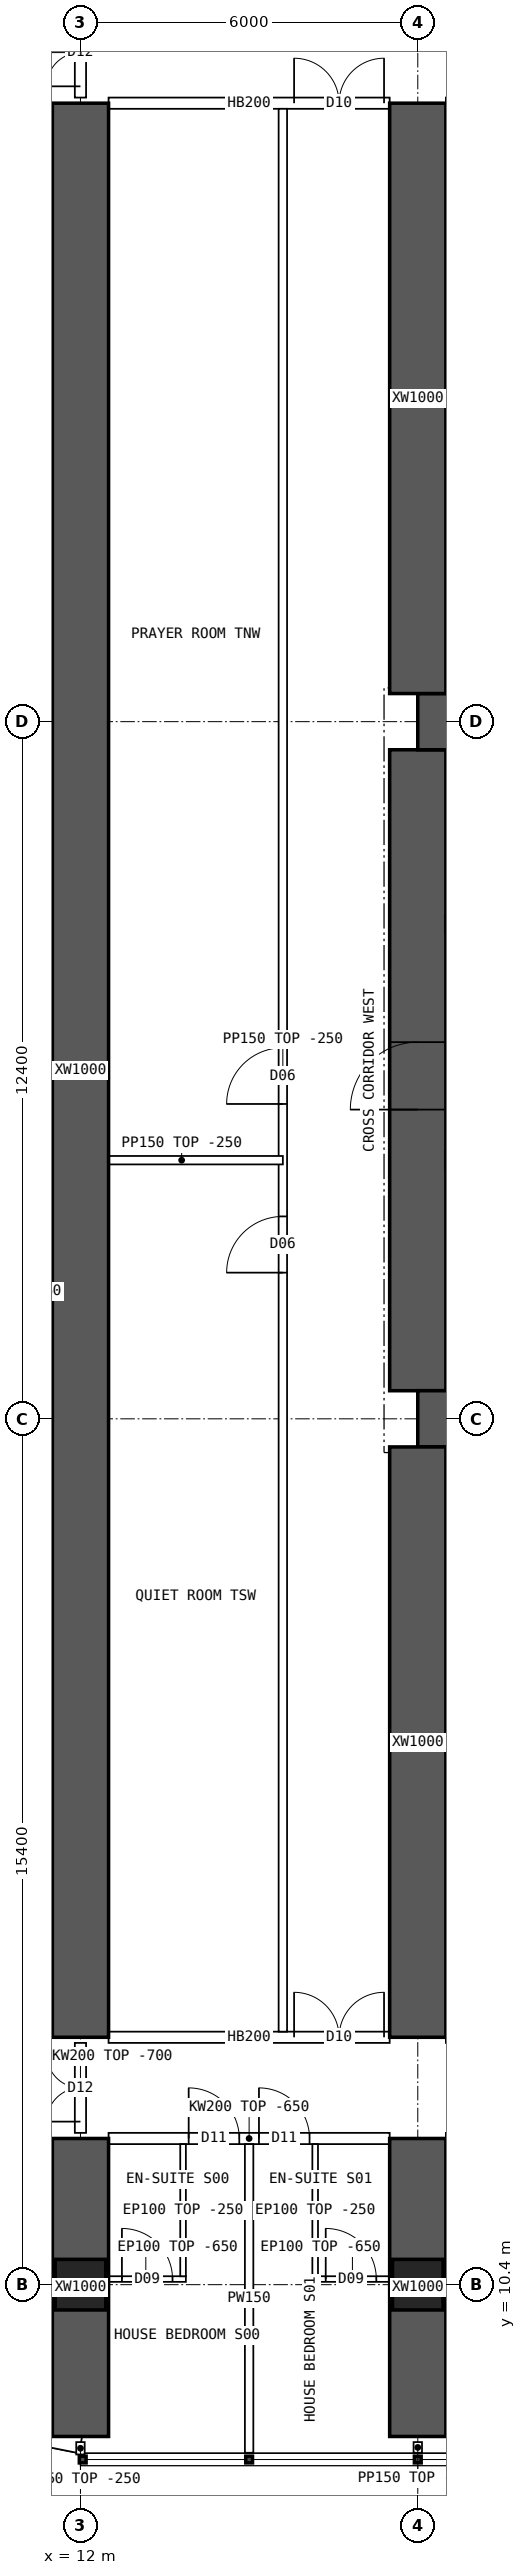
"""IFC4 building model, lengths in metres.
Left out: names, types, materials, properties, quantities, classifications, styles, units other than length and angle.
Written with IfcOpenShell. Run it as: python <this file> out.ifc"""

import sys

from ifc_helpers import new_model, si_unit, direction, frame, frame_2d, origin, origin_2d, place, context, subcontext, project, spatial, polyline, rectangle, hollow_rectangle, outline, extrude, element, fill, save


model = new_model("IFC4")
c1 = context("Model", 3, precision=1e-05, world=origin(), true_north=direction((0.0, 1.0)))
c2 = subcontext(c1, "Body", "Model", "MODEL_VIEW")
j1 = project(units=[si_unit("LENGTHUNIT", "METRE"), si_unit("PLANEANGLEUNIT", "RADIAN")], contexts=[c1])
p1 = place(None, origin())
s1 = spatial("IfcSite", under=j1, at=p1, CompositionType="ELEMENT")
p2 = place(p1, origin())
s2 = spatial("IfcBuilding", under=s1, at=p2, CompositionType="ELEMENT")
p3 = place(p2, frame((0.0, 0.0, 23.95)))
s3 = spatial("IfcBuildingStorey", under=s2, at=p3, CompositionType="ELEMENT", Elevation=23.95)
for number, where, z_axis, x_axis in (
    (1, (12.0, 10.4, 0.0), (0.0, 0.0, 1.0), (1.0, 0.0, 0.0)),
    (2, (18.0, 10.4, 0.0), (0.0, 0.0, 1.0), (1.0, 0.0, 0.0)),
):
    element("IfcColumn", number, at=place(p3, frame(where, z_axis=z_axis, x_axis=x_axis)), inside=s3, PredefinedType="COLUMN", context=c2, shape_type="SweptSolid", body=[
        extrude(hollow_rectangle(XDim=0.9, YDim=0.9, WallThickness=0.09, at=origin_2d()), origin(), (0.0, 0.0, 1.0), 3.75),
    ])
for number, where, z_axis, x_axis in (
    (3, (18.0, 25.8, 0.0), (0.0, 0.0, 1.0), (1.0, 0.0, 0.0)),
    (4, (18.0, 38.2, 0.0), (0.0, 0.0, 1.0), (1.0, 0.0, 0.0)),
):
    element("IfcWall", number, at=place(p3, frame(where, z_axis=z_axis, x_axis=x_axis)), inside=s3, PredefinedType="SHEAR", context=c2, shape_type="SweptSolid", body=[
        extrude(rectangle(XDim=48.0, YDim=1.0, at=frame_2d((24.0, 0.0))), origin(), (0.0, 0.0, 1.0), 3.75),
    ])
p4 = place(p3, frame((18.0, 26.3, 0.0), z_axis=(0.0, 0.0, 1.0), x_axis=(0.0, 1.0, 0.0)))
e5 = element("IfcWall", 5, at=p4, inside=s3, PredefinedType="SHEAR", context=c2, shape_type="SweptSolid", body=[
    extrude(rectangle(XDim=11.4, YDim=1.0, at=frame_2d((5.7, 0.0))), origin(), (0.0, 0.0, 1.0), 3.75),
])
p5 = place(p4, frame((5.0, 0.0, 0.0)))
e6 = element("IfcOpeningElement", 6, at=p5, cuts=e5, PredefinedType="OPENING", context=c2, shape_type="SweptSolid", body=[
    extrude(rectangle(XDim=1.2, YDim=2.1, at=frame_2d((0.6, 1.05))), frame((0.0, 0.51, 0.0), z_axis=(0.0, -1.0, 0.0), x_axis=(1.0, 0.0, 0.0)), (0.0, 0.0, 1.0), 1.02),
])
p6 = place(p3, frame((12.0, 7.7, 0.0), z_axis=(0.0, 0.0, 1.0), x_axis=(0.0, 1.0, 0.0)))
e7 = element("IfcWall", 7, at=p6, inside=s3, PredefinedType="SHEAR", context=c2, shape_type="SweptSolid", body=[
    extrude(rectangle(XDim=5.3, YDim=1.0, at=frame_2d((2.65, 0.0))), origin(), (0.0, 0.0, 1.0), 3.75),
])
p7 = place(p3, frame((12.0, 14.8, 0.0), z_axis=(0.0, 0.0, 1.0), x_axis=(0.0, 1.0, 0.0)))
e8 = element("IfcWall", 8, at=p7, inside=s3, PredefinedType="SHEAR", context=c2, shape_type="SweptSolid", body=[
    extrude(rectangle(XDim=34.4, YDim=1.0, at=frame_2d((17.2, 0.0))), origin(), (0.0, 0.0, 1.0), 3.75),
])
p8 = place(p3, frame((18.0, 7.7, 0.0), z_axis=(0.0, 0.0, 1.0), x_axis=(0.0, 1.0, 0.0)))
e9 = element("IfcWall", 9, at=p8, inside=s3, PredefinedType="SHEAR", context=c2, shape_type="SweptSolid", body=[
    extrude(rectangle(XDim=5.3, YDim=1.0, at=frame_2d((2.65, 0.0))), origin(), (0.0, 0.0, 1.0), 3.75),
])
for number, where, z_axis, x_axis in (
    (10, (18.0, 14.8, 0.0), (0.0, 0.0, 1.0), (0.0, 1.0, 0.0)),
    (11, (18.0, 38.7, 0.0), (0.0, 0.0, 1.0), (0.0, 1.0, 0.0)),
):
    element("IfcWall", number, at=place(p3, frame(where, z_axis=z_axis, x_axis=x_axis)), inside=s3, PredefinedType="SHEAR", context=c2, shape_type="SweptSolid", body=[
        extrude(rectangle(XDim=10.5, YDim=1.0, at=frame_2d((5.25, 0.0))), origin(), (0.0, 0.0, 1.0), 3.75),
    ])
p9 = place(p3, frame((8.843, 8.178, 0.0), z_axis=(0.0, 0.0, 1.0), x_axis=(0.980787251524, -0.195080412259, 0.0)))
e12 = element("IfcWall", 12, at=p9, inside=s3, PredefinedType="SOLIDWALL", context=c2, shape_type="SweptSolid", body=[
    extrude(outline(polyline([(-0.03, -0.15), (3.249, -0.15), (3.189, 0.15), (0.03, 0.15), (-0.03, -0.15)])), origin(), (0.0, 0.0, 1.0), 3.5),
])
p10 = place(p9, frame((0.909, 0.0, 0.9)))
e13 = element("IfcOpeningElement", 13, at=p10, cuts=e12, PredefinedType="OPENING", context=c2, shape_type="SweptSolid", body=[
    extrude(rectangle(XDim=1.4, YDim=1.8, at=frame_2d((0.7, 0.9))), frame((0.0, 0.16, 0.0), z_axis=(0.0, -1.0, 0.0), x_axis=(1.0, 0.0, 0.0)), (0.0, 0.0, 1.0), 0.32),
])
p11 = place(p3, frame((12.5, 13.0, 0.0), z_axis=(0.0, 0.0, 1.0), x_axis=(1.0, 0.0, 0.0)))
e14 = element("IfcWall", 14, at=p11, inside=s3, PredefinedType="SOLIDWALL", context=c2, shape_type="SweptSolid", body=[
    extrude(outline(polyline([(0.0, 0.0), (5.0, 0.0), (5.0, 3.1), (0.0, 3.1), (0.0, 0.0)])), frame((0.0, 0.1, 0.0), z_axis=(0.0, -1.0, 0.0), x_axis=(1.0, 0.0, 0.0)), (0.0, 0.0, 1.0), 0.2),
])
p12 = place(p11, frame((1.425, 0.0, 0.0)))
e15 = element("IfcOpeningElement", 15, at=p12, cuts=e14, PredefinedType="OPENING", context=c2, shape_type="SweptSolid", body=[
    extrude(rectangle(XDim=0.9, YDim=2.1, at=frame_2d((0.45, 1.05))), frame((0.0, 0.11, 0.0), z_axis=(0.0, -1.0, 0.0), x_axis=(1.0, 0.0, 0.0)), (0.0, 0.0, 1.0), 0.22),
])
p13 = place(p11, frame((2.675, 0.0, 0.0)))
e16 = element("IfcOpeningElement", 16, at=p13, cuts=e14, PredefinedType="OPENING", context=c2, shape_type="SweptSolid", body=[
    extrude(rectangle(XDim=0.9, YDim=2.1, at=frame_2d((0.45, 1.05))), frame((0.0, 0.11, 0.0), z_axis=(0.0, -1.0, 0.0), x_axis=(1.0, 0.0, 0.0)), (0.0, 0.0, 1.0), 0.22),
])
p14 = place(p3, frame((12.5, 14.8, 0.0), z_axis=(0.0, 0.0, 1.0), x_axis=(1.0, 0.0, 0.0)))
e17 = element("IfcWall", 17, at=p14, inside=s3, PredefinedType="SOLIDWALL", context=c2, shape_type="SweptSolid", body=[
    extrude(rectangle(XDim=5.0, YDim=0.2, at=frame_2d((2.5, 0.0))), origin(), (0.0, 0.0, 1.0), 3.5),
])
p15 = place(p14, frame((3.3, 0.0, 0.0)))
e18 = element("IfcOpeningElement", 18, at=p15, cuts=e17, PredefinedType="OPENING", context=c2, shape_type="SweptSolid", body=[
    extrude(rectangle(XDim=1.6, YDim=2.1, at=frame_2d((0.8, 1.05))), frame((0.0, 0.11, 0.0), z_axis=(0.0, -1.0, 0.0), x_axis=(1.0, 0.0, 0.0)), (0.0, 0.0, 1.0), 0.22),
])
p16 = place(p3, frame((12.5, 49.2, 0.0), z_axis=(0.0, 0.0, 1.0), x_axis=(1.0, 0.0, 0.0)))
e19 = element("IfcWall", 19, at=p16, inside=s3, PredefinedType="SOLIDWALL", context=c2, shape_type="SweptSolid", body=[
    extrude(rectangle(XDim=5.0, YDim=0.2, at=frame_2d((2.5, 0.0))), origin(), (0.0, 0.0, 1.0), 3.5),
])
p17 = place(p16, frame((3.3, 0.0, 0.0)))
e20 = element("IfcOpeningElement", 20, at=p17, cuts=e19, PredefinedType="OPENING", context=c2, shape_type="SweptSolid", body=[
    extrude(rectangle(XDim=1.6, YDim=2.1, at=frame_2d((0.8, 1.05))), frame((0.0, 0.11, 0.0), z_axis=(0.0, -1.0, 0.0), x_axis=(1.0, 0.0, 0.0)), (0.0, 0.0, 1.0), 0.22),
])
p18 = place(p3, frame((15.0, 7.41, 0.0), z_axis=(0.0, 0.0, 1.0), x_axis=(0.0, 1.0, 0.0)))
e21 = element("IfcWall", 21, at=p18, inside=s3, PredefinedType="PARTITIONING", context=c2, shape_type="SweptSolid", body=[
    extrude(outline(polyline([(0.0, 0.0), (5.49, 0.0), (5.49, 3.1), (5.442, 3.1), (5.44, 3.5), (3.192, 3.5), (3.19, 3.1), (2.792, 3.1), (2.79, 3.5), (0.0, 3.5), (0.0, 0.0)])), frame((0.0, 0.075, 0.0), z_axis=(0.0, -1.0, 0.0), x_axis=(1.0, 0.0, 0.0)), (0.0, 0.0, 1.0), 0.15),
])
p19 = place(p3, frame((13.875, 10.5, 0.0), z_axis=(0.0, 0.0, 1.0), x_axis=(-1.0, 0.0, 0.0)))
e22 = element("IfcWall", 22, at=p19, inside=s3, PredefinedType="PARTITIONING", context=c2, shape_type="SweptSolid", body=[
    extrude(outline(polyline([(0.0, 0.0), (1.425, 0.0), (1.425, 3.1), (0.0, 3.1), (0.0, 0.0)])), frame((0.0, 0.05, 0.0), z_axis=(0.0, -1.0, 0.0), x_axis=(1.0, 0.0, 0.0)), (0.0, 0.0, 1.0), 0.1),
])
p20 = place(p19, frame((0.238, 0.0, 0.0)))
e23 = element("IfcOpeningElement", 23, at=p20, cuts=e22, PredefinedType="OPENING", context=c2, shape_type="SweptSolid", body=[
    extrude(rectangle(XDim=0.9, YDim=2.1, at=frame_2d((0.45, 1.05))), frame((0.0, 0.06, 0.0), z_axis=(0.0, -1.0, 0.0), x_axis=(1.0, 0.0, 0.0)), (0.0, 0.0, 1.0), 0.12),
])
p21 = place(p3, frame((13.825, 10.55, 0.0), z_axis=(0.0, 0.0, 1.0), x_axis=(0.0, 1.0, 0.0)))
e24 = element("IfcWall", 24, at=p21, inside=s3, PredefinedType="PARTITIONING", context=c2, shape_type="SweptSolid", body=[
    extrude(outline(polyline([(0.0, 0.0), (2.35, 0.0), (2.35, 3.1), (2.302, 3.1), (2.3, 3.5), (0.052, 3.5), (0.05, 3.1), (0.0, 3.1), (0.0, 0.0)])), frame((0.0, 0.05, 0.0), z_axis=(0.0, -1.0, 0.0), x_axis=(1.0, 0.0, 0.0)), (0.0, 0.0, 1.0), 0.1),
])
p22 = place(p3, frame((17.55, 10.5, 0.0), z_axis=(0.0, 0.0, 1.0), x_axis=(-1.0, 0.0, 0.0)))
e25 = element("IfcWall", 25, at=p22, inside=s3, PredefinedType="PARTITIONING", context=c2, shape_type="SweptSolid", body=[
    extrude(outline(polyline([(0.0, 0.0), (1.425, 0.0), (1.425, 3.1), (0.0, 3.1), (0.0, 0.0)])), frame((0.0, 0.05, 0.0), z_axis=(0.0, -1.0, 0.0), x_axis=(1.0, 0.0, 0.0)), (0.0, 0.0, 1.0), 0.1),
])
p23 = place(p22, frame((0.288, 0.0, 0.0)))
e26 = element("IfcOpeningElement", 26, at=p23, cuts=e25, PredefinedType="OPENING", context=c2, shape_type="SweptSolid", body=[
    extrude(rectangle(XDim=0.9, YDim=2.1, at=frame_2d((0.45, 1.05))), frame((0.0, 0.06, 0.0), z_axis=(0.0, -1.0, 0.0), x_axis=(1.0, 0.0, 0.0)), (0.0, 0.0, 1.0), 0.12),
])
p24 = place(p3, frame((16.175, 10.55, 0.0), z_axis=(0.0, 0.0, 1.0), x_axis=(0.0, 1.0, 0.0)))
e27 = element("IfcWall", 27, at=p24, inside=s3, PredefinedType="PARTITIONING", context=c2, shape_type="SweptSolid", body=[
    extrude(outline(polyline([(0.0, 0.0), (2.35, 0.0), (2.35, 3.1), (2.302, 3.1), (2.3, 3.5), (0.052, 3.5), (0.05, 3.1), (0.0, 3.1), (0.0, 0.0)])), frame((0.0, 0.05, 0.0), z_axis=(0.0, -1.0, 0.0), x_axis=(1.0, 0.0, 0.0)), (0.0, 0.0, 1.0), 0.1),
])
p25 = place(p3, frame((19.875, 10.5, 0.0), z_axis=(0.0, 0.0, 1.0), x_axis=(-1.0, 0.0, 0.0)))
e28 = element("IfcWall", 28, at=p25, inside=s3, PredefinedType="PARTITIONING", context=c2, shape_type="SweptSolid", body=[
    extrude(outline(polyline([(0.0, 0.0), (1.425, 0.0), (1.425, 3.1), (0.0, 3.1), (0.0, 0.0)])), frame((0.0, 0.05, 0.0), z_axis=(0.0, -1.0, 0.0), x_axis=(1.0, 0.0, 0.0)), (0.0, 0.0, 1.0), 0.1),
])
p26 = place(p25, frame((0.238, 0.0, 0.0)))
e29 = element("IfcOpeningElement", 29, at=p26, cuts=e28, PredefinedType="OPENING", context=c2, shape_type="SweptSolid", body=[
    extrude(rectangle(XDim=0.9, YDim=2.1, at=frame_2d((0.45, 1.05))), frame((0.0, 0.06, 0.0), z_axis=(0.0, -1.0, 0.0), x_axis=(1.0, 0.0, 0.0)), (0.0, 0.0, 1.0), 0.12),
])
p27 = place(p3, frame((15.6, 14.9, 0.0), z_axis=(0.0, 0.0, 1.0), x_axis=(0.0, 1.0, 0.0)))
e30 = element("IfcWall", 30, at=p27, inside=s3, PredefinedType="PARTITIONING", context=c2, shape_type="SweptSolid", body=[
    extrude(rectangle(XDim=34.2, YDim=0.15, at=frame_2d((17.1, 0.0))), origin(), (0.0, 0.0, 1.0), 3.5),
])
p28 = place(p27, frame((13.5, 0.0, 0.0)))
e31 = element("IfcOpeningElement", 31, at=p28, cuts=e30, PredefinedType="OPENING", context=c2, shape_type="SweptSolid", body=[
    extrude(rectangle(XDim=1.0, YDim=2.1, at=frame_2d((0.5, 1.05))), frame((0.0, 0.085, 0.0), z_axis=(0.0, -1.0, 0.0), x_axis=(1.0, 0.0, 0.0)), (0.0, 0.0, 1.0), 0.17),
])
p29 = place(p27, frame((16.5, 0.0, 0.0)))
e32 = element("IfcOpeningElement", 32, at=p29, cuts=e30, PredefinedType="OPENING", context=c2, shape_type="SweptSolid", body=[
    extrude(rectangle(XDim=1.0, YDim=2.1, at=frame_2d((0.5, 1.05))), frame((0.0, 0.085, 0.0), z_axis=(0.0, -1.0, 0.0), x_axis=(1.0, 0.0, 0.0)), (0.0, 0.0, 1.0), 0.17),
])
p30 = place(p3, frame((12.0, 30.4, 0.0), z_axis=(0.0, 0.0, 1.0), x_axis=(1.0, 0.0, 0.0)))
e33 = element("IfcWall", 33, at=p30, inside=s3, PredefinedType="PARTITIONING", context=c2, shape_type="SweptSolid", body=[
    extrude(rectangle(XDim=3.6, YDim=0.15, at=frame_2d((1.8, 0.0))), origin(), (0.0, 0.0, 1.0), 3.5),
])
p31 = place(p3, frame((3.905, 30.85, 0.0), z_axis=(0.0, 0.0, 1.0), x_axis=(1.0, 0.0, 0.0)))
e34 = element("IfcWall", 34, at=p31, inside=s3, PredefinedType="PARTITIONING", context=c2, shape_type="SweptSolid", body=[
    extrude(outline(polyline([(0.0, 0.0), (8.02, 0.0), (8.02, 3.5), (2.397, 3.5), (2.395, 3.05), (1.797, 3.05), (1.795, 3.5), (0.0, 3.5), (0.0, 0.0)])), frame((0.0, 0.075, 0.0), z_axis=(0.0, -1.0, 0.0), x_axis=(1.0, 0.0, 0.0)), (0.0, 0.0, 1.0), 0.15),
])
p32 = place(p3, frame((12.0, 13.1, 0.0), z_axis=(0.0, 0.0, 1.0), x_axis=(0.0, 1.0, 0.0)))
e35 = element("IfcWall", 35, at=p32, inside=s3, PredefinedType="SOLIDWALL", context=c2, shape_type="SweptSolid", body=[
    extrude(outline(polyline([(0.0, 0.0), (1.6, 0.0), (1.6, 3.05), (0.0, 3.05), (0.0, 0.0)])), frame((0.0, 0.1, 0.0), z_axis=(0.0, -1.0, 0.0), x_axis=(1.0, 0.0, 0.0)), (0.0, 0.0, 1.0), 0.2),
])
p33 = place(p32, frame((0.2, 0.0, 0.0)))
e36 = element("IfcOpeningElement", 36, at=p33, cuts=e35, PredefinedType="OPENING", context=c2, shape_type="SweptSolid", body=[
    extrude(rectangle(XDim=1.2, YDim=2.1, at=frame_2d((0.6, 1.05))), frame((0.0, 0.11, 0.0), z_axis=(0.0, -1.0, 0.0), x_axis=(1.0, 0.0, 0.0)), (0.0, 0.0, 1.0), 0.22),
])
p34 = place(p3, frame((12.0, 49.3, 0.0), z_axis=(0.0, 0.0, 1.0), x_axis=(0.0, 1.0, 0.0)))
e37 = element("IfcWall", 37, at=p34, inside=s3, PredefinedType="SOLIDWALL", context=c2, shape_type="SweptSolid", body=[
    extrude(outline(polyline([(0.0, 0.0), (1.6, 0.0), (1.6, 3.05), (0.0, 3.05), (0.0, 0.0)])), frame((0.0, 0.1, 0.0), z_axis=(0.0, -1.0, 0.0), x_axis=(1.0, 0.0, 0.0)), (0.0, 0.0, 1.0), 0.2),
])
p35 = place(p34, frame((0.2, 0.0, 0.0)))
e38 = element("IfcOpeningElement", 38, at=p35, cuts=e37, PredefinedType="OPENING", context=c2, shape_type="SweptSolid", body=[
    extrude(rectangle(XDim=1.2, YDim=2.1, at=frame_2d((0.6, 1.05))), frame((0.0, 0.11, 0.0), z_axis=(0.0, -1.0, 0.0), x_axis=(1.0, 0.0, 0.0)), (0.0, 0.0, 1.0), 0.22),
])
p36 = place(p3, frame((12.0, 7.6, 0.0), z_axis=(0.0, 0.0, 1.0), x_axis=(0.0, -1.0, 0.0)))
e39 = element("IfcWall", 39, at=p36, inside=s3, PredefinedType="PARTITIONING", context=c2, shape_type="SweptSolid", body=[
    extrude(rectangle(XDim=0.22, YDim=0.15, at=frame_2d((0.11, 0.0))), origin(), (0.0, 0.0, 1.0), 3.5),
])
p37 = place(p3, frame((18.0, 7.6, 0.0), z_axis=(0.0, 0.0, 1.0), x_axis=(0.0, -1.0, 0.0)))
e40 = element("IfcWall", 40, at=p37, inside=s3, PredefinedType="PARTITIONING", context=c2, shape_type="SweptSolid", body=[
    extrude(rectangle(XDim=0.19, YDim=0.15, at=frame_2d((0.095, 0.0))), origin(), (0.0, 0.0, 1.0), 3.5),
])
p38 = place(p5, origin())
e41 = element("IfcDoor", 41, at=p38, inside=s3, OperationType="SINGLE_SWING_LEFT", PredefinedType="DOOR", context=c2, shape_type="SweptSolid", body=[
    extrude(rectangle(XDim=1.2, YDim=2.1, at=frame_2d((0.6, 1.05))), frame((0.0, 0.025, 0.0), z_axis=(0.0, -1.0, 0.0), x_axis=(1.0, 0.0, 0.0)), (0.0, 0.0, 1.0), 0.05),
])
fill(e6, e41)
p39 = place(p15, origin())
e42 = element("IfcDoor", 42, at=p39, inside=s3, OperationType="DOUBLE_DOOR_SINGLE_SWING", PredefinedType="DOOR", context=c2, shape_type="SweptSolid", body=[
    extrude(rectangle(XDim=1.6, YDim=2.1, at=frame_2d((0.8, 1.05))), frame((0.0, 0.025, 0.0), z_axis=(0.0, -1.0, 0.0), x_axis=(1.0, 0.0, 0.0)), (0.0, 0.0, 1.0), 0.05),
])
fill(e18, e42)
p40 = place(p17, origin())
e43 = element("IfcDoor", 43, at=p40, inside=s3, OperationType="DOUBLE_DOOR_SINGLE_SWING", PredefinedType="DOOR", context=c2, shape_type="SweptSolid", body=[
    extrude(rectangle(XDim=1.6, YDim=2.1, at=frame_2d((0.8, 1.05))), frame((0.0, 0.025, 0.0), z_axis=(0.0, -1.0, 0.0), x_axis=(1.0, 0.0, 0.0)), (0.0, 0.0, 1.0), 0.05),
])
fill(e20, e43)
p41 = place(p20, origin())
e44 = element("IfcDoor", 44, at=p41, inside=s3, OperationType="SINGLE_SWING_RIGHT", PredefinedType="DOOR", context=c2, shape_type="SweptSolid", body=[
    extrude(rectangle(XDim=0.9, YDim=2.1, at=frame_2d((0.45, 1.05))), frame((0.0, 0.025, 0.0), z_axis=(0.0, -1.0, 0.0), x_axis=(1.0, 0.0, 0.0)), (0.0, 0.0, 1.0), 0.05),
])
fill(e23, e44)
p42 = place(p12, origin())
e45 = element("IfcDoor", 45, at=p42, inside=s3, OperationType="SINGLE_SWING_LEFT", PredefinedType="DOOR", context=c2, shape_type="SweptSolid", body=[
    extrude(rectangle(XDim=0.9, YDim=2.1, at=frame_2d((0.45, 1.05))), frame((0.0, 0.025, 0.0), z_axis=(0.0, -1.0, 0.0), x_axis=(1.0, 0.0, 0.0)), (0.0, 0.0, 1.0), 0.05),
])
fill(e15, e45)
p43 = place(p23, origin())
e46 = element("IfcDoor", 46, at=p43, inside=s3, OperationType="SINGLE_SWING_RIGHT", PredefinedType="DOOR", context=c2, shape_type="SweptSolid", body=[
    extrude(rectangle(XDim=0.9, YDim=2.1, at=frame_2d((0.45, 1.05))), frame((0.0, 0.025, 0.0), z_axis=(0.0, -1.0, 0.0), x_axis=(1.0, 0.0, 0.0)), (0.0, 0.0, 1.0), 0.05),
])
fill(e26, e46)
p44 = place(p13, origin())
e47 = element("IfcDoor", 47, at=p44, inside=s3, OperationType="SINGLE_SWING_LEFT", PredefinedType="DOOR", context=c2, shape_type="SweptSolid", body=[
    extrude(rectangle(XDim=0.9, YDim=2.1, at=frame_2d((0.45, 1.05))), frame((0.0, 0.025, 0.0), z_axis=(0.0, -1.0, 0.0), x_axis=(1.0, 0.0, 0.0)), (0.0, 0.0, 1.0), 0.05),
])
fill(e16, e47)
p45 = place(p28, origin())
e48 = element("IfcDoor", 48, at=p45, inside=s3, OperationType="SINGLE_SWING_LEFT", PredefinedType="DOOR", context=c2, shape_type="SweptSolid", body=[
    extrude(rectangle(XDim=1.0, YDim=2.1, at=frame_2d((0.5, 1.05))), frame((0.0, 0.025, 0.0), z_axis=(0.0, -1.0, 0.0), x_axis=(1.0, 0.0, 0.0)), (0.0, 0.0, 1.0), 0.05),
])
fill(e31, e48)
p46 = place(p29, origin())
e49 = element("IfcDoor", 49, at=p46, inside=s3, OperationType="SINGLE_SWING_LEFT", PredefinedType="DOOR", context=c2, shape_type="SweptSolid", body=[
    extrude(rectangle(XDim=1.0, YDim=2.1, at=frame_2d((0.5, 1.05))), frame((0.0, 0.025, 0.0), z_axis=(0.0, -1.0, 0.0), x_axis=(1.0, 0.0, 0.0)), (0.0, 0.0, 1.0), 0.05),
])
fill(e32, e49)
p47 = place(p33, origin())
e50 = element("IfcDoor", 50, at=p47, inside=s3, OperationType="DOUBLE_DOOR_SINGLE_SWING", PredefinedType="DOOR", context=c2, shape_type="SweptSolid", body=[
    extrude(rectangle(XDim=1.2, YDim=2.1, at=frame_2d((0.6, 1.05))), frame((0.0, 0.025, 0.0), z_axis=(0.0, -1.0, 0.0), x_axis=(1.0, 0.0, 0.0)), (0.0, 0.0, 1.0), 0.05),
])
fill(e36, e50)
p48 = place(p35, origin())
e51 = element("IfcDoor", 51, at=p48, inside=s3, OperationType="DOUBLE_DOOR_SINGLE_SWING", PredefinedType="DOOR", context=c2, shape_type="SweptSolid", body=[
    extrude(rectangle(XDim=1.2, YDim=2.1, at=frame_2d((0.6, 1.05))), frame((0.0, 0.025, 0.0), z_axis=(0.0, -1.0, 0.0), x_axis=(1.0, 0.0, 0.0)), (0.0, 0.0, 1.0), 0.05),
])
fill(e38, e51)
save(model, sys.argv[1])
